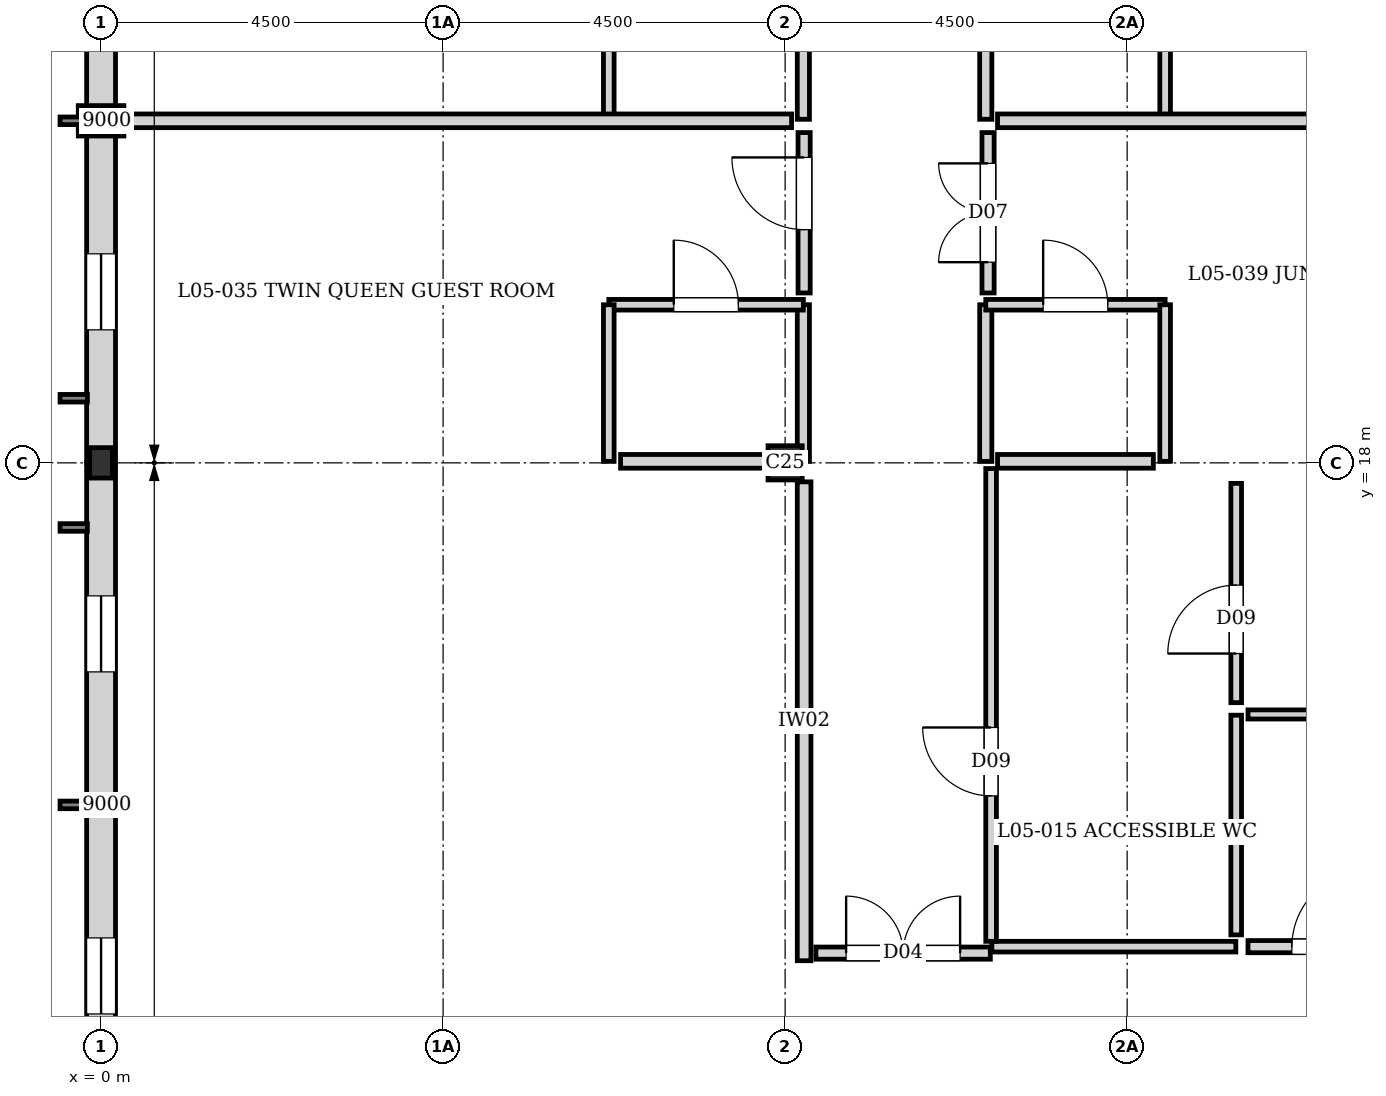
"""IFC4 building model, lengths in metres.
Left out: names, types, materials, properties, quantities, classifications, styles, units other than length and angle.
Written with IfcOpenShell. Run it as: python <this file> out.ifc"""

import sys

from ifc_helpers import new_model, si_unit, direction, frame, frame_2d, origin, origin_2d, place, context, subcontext, project, spatial, rectangle, i_section, extrude, element, fill, save


model = new_model("IFC4")
c1 = context("Model", 3, precision=1e-05, world=origin(), true_north=direction((0.0, 1.0)))
c2 = subcontext(c1, "Body", "Model", "MODEL_VIEW")
j1 = project(units=[si_unit("LENGTHUNIT", "METRE"), si_unit("PLANEANGLEUNIT", "RADIAN")], contexts=[c1])
p1 = place(None, origin())
s1 = spatial("IfcSite", under=j1, at=p1, CompositionType="ELEMENT")
p2 = place(p1, origin())
s2 = spatial("IfcBuilding", under=s1, at=p2, CompositionType="ELEMENT")
p3 = place(p2, frame((0.0, 0.0, 17.6)))
s3 = spatial("IfcBuildingStorey", under=s2, at=p3, CompositionType="ELEMENT", Elevation=17.6)
p4 = place(p3, frame((0.0, 18.0, 0.0), z_axis=(0.0, 0.0, 1.0), x_axis=(1.0, 0.0, 0.0)))
e1 = element("IfcColumn", 1, at=p4, inside=s3, PredefinedType="COLUMN", context=c2, shape_type="SweptSolid", body=[
    extrude(i_section(OverallWidth=0.3, OverallDepth=0.4, WebThickness=0.013, FlangeThickness=0.024, at=origin_2d()), origin(), (0.0, 0.0, 1.0), 3.04),
])
p5 = place(p3, frame((9.0, 18.0, 0.0), z_axis=(0.0, 0.0, 1.0), x_axis=(1.0, 0.0, 0.0)))
e2 = element("IfcColumn", 2, at=p5, inside=s3, PredefinedType="COLUMN", context=c2, shape_type="SweptSolid", body=[
    extrude(rectangle(XDim=0.45, YDim=0.45, at=origin_2d()), origin(), (0.0, 0.0, 1.0), 3.04),
])
p6 = place(p3, frame((0.0, 22.5, 0.0), z_axis=(0.0, 0.0, 1.0), x_axis=(0.0, 1.0, 0.0)))
e3 = element("IfcColumn", 3, at=p6, inside=s3, PredefinedType="PILASTER", context=c2, shape_type="SweptSolid", body=[
    extrude(rectangle(XDim=0.4, YDim=0.6, at=origin_2d()), origin(), (0.0, 0.0, 1.0), 3.04),
])
p7 = place(p3, frame((0.0, 9.0, 0.0), z_axis=(0.0, 0.0, 1.0), x_axis=(0.0, 1.0, 0.0)))
e4 = element("IfcWall", 4, at=p7, inside=s3, PredefinedType="SOLIDWALL", context=c2, shape_type="SweptSolid", body=[
    extrude(rectangle(XDim=9.0, YDim=0.38, at=frame_2d((4.5, 0.0))), origin(), (0.0, 0.0, 1.0), 2.48),
])
p8 = place(p7, frame((1.75, 0.0, 0.35)))
e5 = element("IfcOpeningElement", 5, at=p8, cuts=e4, PredefinedType="OPENING", context=c2, shape_type="SweptSolid", body=[
    extrude(rectangle(XDim=1.0, YDim=1.6, at=frame_2d((0.5, 0.8))), frame((0.0, 0.2, 0.0), z_axis=(0.0, -1.0, 0.0), x_axis=(1.0, 0.0, 0.0)), (0.0, 0.0, 1.0), 0.4),
])
p9 = place(p7, frame((6.25, 0.0, 0.35)))
e6 = element("IfcOpeningElement", 6, at=p9, cuts=e4, PredefinedType="OPENING", context=c2, shape_type="SweptSolid", body=[
    extrude(rectangle(XDim=1.0, YDim=1.6, at=frame_2d((0.5, 0.8))), frame((0.0, 0.2, 0.0), z_axis=(0.0, -1.0, 0.0), x_axis=(1.0, 0.0, 0.0)), (0.0, 0.0, 1.0), 0.4),
])
p10 = place(p3, frame((0.0, 18.0, 0.0), z_axis=(0.0, 0.0, 1.0), x_axis=(0.0, 1.0, 0.0)))
e7 = element("IfcWall", 7, at=p10, inside=s3, PredefinedType="SOLIDWALL", context=c2, shape_type="SweptSolid", body=[
    extrude(rectangle(XDim=9.0, YDim=0.38, at=frame_2d((4.5, 0.0))), origin(), (0.0, 0.0, 1.0), 2.42),
])
p11 = place(p10, frame((1.75, 0.0, 0.35)))
e8 = element("IfcOpeningElement", 8, at=p11, cuts=e7, PredefinedType="OPENING", context=c2, shape_type="SweptSolid", body=[
    extrude(rectangle(XDim=1.0, YDim=1.6, at=frame_2d((0.5, 0.8))), frame((0.0, 0.2, 0.0), z_axis=(0.0, -1.0, 0.0), x_axis=(1.0, 0.0, 0.0)), (0.0, 0.0, 1.0), 0.4),
])
p12 = place(p10, frame((6.25, 0.0, 0.35)))
e9 = element("IfcOpeningElement", 9, at=p12, cuts=e7, PredefinedType="OPENING", context=c2, shape_type="SweptSolid", body=[
    extrude(rectangle(XDim=1.0, YDim=1.6, at=frame_2d((0.5, 0.8))), frame((0.0, 0.2, 0.0), z_axis=(0.0, -1.0, 0.0), x_axis=(1.0, 0.0, 0.0)), (0.0, 0.0, 1.0), 0.4),
])
p13 = place(p3, frame((9.24, 18.02, 0.0), z_axis=(0.0, 0.0, 1.0), x_axis=(0.0, 1.0, 0.0)))
e10 = element("IfcWall", 10, at=p13, inside=s3, PredefinedType="PARTITIONING", context=c2, shape_type="SweptSolid", body=[
    extrude(rectangle(XDim=2.06, YDim=0.16, at=frame_2d((1.03, 0.0))), origin(), (0.0, 0.0, 1.0), 2.82),
])
p14 = place(p3, frame((6.68, 20.08, 0.0), z_axis=(0.0, 0.0, 1.0), x_axis=(1.0, 0.0, 0.0)))
e11 = element("IfcWall", 11, at=p14, inside=s3, PredefinedType="PLUMBINGWALL", context=c2, shape_type="SweptSolid", body=[
    extrude(rectangle(XDim=2.56, YDim=0.14, at=frame_2d((1.28, 0.0))), origin(), (0.0, 0.0, 1.0), 2.82),
])
p15 = place(p14, frame((0.855, 0.0, 0.0)))
e12 = element("IfcOpeningElement", 12, at=p15, cuts=e11, PredefinedType="OPENING", context=c2, shape_type="SweptSolid", body=[
    extrude(rectangle(XDim=0.85, YDim=2.04, at=frame_2d((0.425, 1.02))), frame((0.0, 0.08, 0.0), z_axis=(0.0, -1.0, 0.0), x_axis=(1.0, 0.0, 0.0)), (0.0, 0.0, 1.0), 0.16),
])
p16 = place(p3, frame((6.68, 18.02, 0.0), z_axis=(0.0, 0.0, 1.0), x_axis=(0.0, 1.0, 0.0)))
e13 = element("IfcWall", 13, at=p16, inside=s3, PredefinedType="PLUMBINGWALL", context=c2, shape_type="SweptSolid", body=[
    extrude(rectangle(XDim=2.06, YDim=0.14, at=frame_2d((1.03, 0.0))), origin(), (0.0, 0.0, 1.0), 2.82),
])
p17 = place(p3, frame((9.24, 22.52, 0.0), z_axis=(0.0, 0.0, 1.0), x_axis=(0.0, 1.0, 0.0)))
e14 = element("IfcWall", 14, at=p17, inside=s3, PredefinedType="PARTITIONING", context=c2, shape_type="SweptSolid", body=[
    extrude(rectangle(XDim=2.06, YDim=0.16, at=frame_2d((1.03, 0.0))), origin(), (0.0, 0.0, 1.0), 2.82),
])
p18 = place(p3, frame((6.68, 22.52, 0.0), z_axis=(0.0, 0.0, 1.0), x_axis=(0.0, 1.0, 0.0)))
e15 = element("IfcWall", 15, at=p18, inside=s3, PredefinedType="PLUMBINGWALL", context=c2, shape_type="SweptSolid", body=[
    extrude(rectangle(XDim=2.06, YDim=0.14, at=frame_2d((1.03, 0.0))), origin(), (0.0, 0.0, 1.0), 2.82),
])
p19 = place(p3, frame((11.64, 18.02, 0.0), z_axis=(0.0, 0.0, 1.0), x_axis=(0.0, 1.0, 0.0)))
e16 = element("IfcWall", 16, at=p19, inside=s3, PredefinedType="PARTITIONING", context=c2, shape_type="SweptSolid", body=[
    extrude(rectangle(XDim=2.06, YDim=0.16, at=frame_2d((1.03, 0.0))), origin(), (0.0, 0.0, 1.0), 2.82),
])
p20 = place(p3, frame((11.64, 20.08, 0.0), z_axis=(0.0, 0.0, 1.0), x_axis=(1.0, 0.0, 0.0)))
e17 = element("IfcWall", 17, at=p20, inside=s3, PredefinedType="PLUMBINGWALL", context=c2, shape_type="SweptSolid", body=[
    extrude(rectangle(XDim=2.36, YDim=0.14, at=frame_2d((1.18, 0.0))), origin(), (0.0, 0.0, 1.0), 2.82),
])
p21 = place(p20, frame((0.755, 0.0, 0.0)))
e18 = element("IfcOpeningElement", 18, at=p21, cuts=e17, PredefinedType="OPENING", context=c2, shape_type="SweptSolid", body=[
    extrude(rectangle(XDim=0.85, YDim=2.04, at=frame_2d((0.425, 1.02))), frame((0.0, 0.08, 0.0), z_axis=(0.0, -1.0, 0.0), x_axis=(1.0, 0.0, 0.0)), (0.0, 0.0, 1.0), 0.16),
])
p22 = place(p3, frame((14.0, 18.02, 0.0), z_axis=(0.0, 0.0, 1.0), x_axis=(0.0, 1.0, 0.0)))
e19 = element("IfcWall", 19, at=p22, inside=s3, PredefinedType="PLUMBINGWALL", context=c2, shape_type="SweptSolid", body=[
    extrude(rectangle(XDim=2.06, YDim=0.14, at=frame_2d((1.03, 0.0))), origin(), (0.0, 0.0, 1.0), 2.82),
])
p23 = place(p3, frame((11.64, 22.52, 0.0), z_axis=(0.0, 0.0, 1.0), x_axis=(0.0, 1.0, 0.0)))
e20 = element("IfcWall", 20, at=p23, inside=s3, PredefinedType="PARTITIONING", context=c2, shape_type="SweptSolid", body=[
    extrude(rectangle(XDim=2.06, YDim=0.16, at=frame_2d((1.03, 0.0))), origin(), (0.0, 0.0, 1.0), 2.82),
])
p24 = place(p3, frame((14.0, 22.52, 0.0), z_axis=(0.0, 0.0, 1.0), x_axis=(0.0, 1.0, 0.0)))
e21 = element("IfcWall", 21, at=p24, inside=s3, PredefinedType="PLUMBINGWALL", context=c2, shape_type="SweptSolid", body=[
    extrude(rectangle(XDim=2.06, YDim=0.14, at=frame_2d((1.03, 0.0))), origin(), (0.0, 0.0, 1.0), 2.82),
])
p25 = place(p3, frame((9.25, 11.45, 0.0), z_axis=(0.0, 0.0, 1.0), x_axis=(0.0, 1.0, 0.0)))
e22 = element("IfcWall", 22, at=p25, inside=s3, PredefinedType="PARTITIONING", context=c2, shape_type="SweptSolid", body=[
    extrude(rectangle(XDim=6.3, YDim=0.18, at=frame_2d((3.15, 0.0))), origin(), (0.0, 0.0, 1.0), 2.82),
])
p26 = place(p3, frame((0.195, 22.5, 0.0), z_axis=(0.0, 0.0, 1.0), x_axis=(1.0, 0.0, 0.0)))
e23 = element("IfcWall", 23, at=p26, inside=s3, PredefinedType="PARTITIONING", context=c2, shape_type="SweptSolid", body=[
    extrude(rectangle(XDim=8.89, YDim=0.18, at=frame_2d((4.445, 0.0))), origin(), (0.0, 0.0, 1.0), 2.82),
])
p27 = place(p3, frame((11.795, 22.5, 0.0), z_axis=(0.0, 0.0, 1.0), x_axis=(1.0, 0.0, 0.0)))
e24 = element("IfcWall", 24, at=p27, inside=s3, PredefinedType="PARTITIONING", context=c2, shape_type="SweptSolid", body=[
    extrude(rectangle(XDim=6.03, YDim=0.18, at=frame_2d((3.015, 0.0))), origin(), (0.0, 0.0, 1.0), 2.82),
])
p28 = place(p3, frame((6.835, 18.02, 0.0), z_axis=(0.0, 0.0, 1.0), x_axis=(1.0, 0.0, 0.0)))
e25 = element("IfcWall", 25, at=p28, inside=s3, PredefinedType="PARTITIONING", context=c2, shape_type="SweptSolid", body=[
    extrude(rectangle(XDim=2.26, YDim=0.18, at=frame_2d((1.13, 0.0))), origin(), (0.0, 0.0, 1.0), 2.38),
])
p29 = place(p3, frame((11.795, 18.02, 0.0), z_axis=(0.0, 0.0, 1.0), x_axis=(1.0, 0.0, 0.0)))
e26 = element("IfcWall", 26, at=p29, inside=s3, PredefinedType="PARTITIONING", context=c2, shape_type="SweptSolid", body=[
    extrude(rectangle(XDim=2.05, YDim=0.18, at=frame_2d((1.025, 0.0))), origin(), (0.0, 0.0, 1.0), 2.55),
])
p30 = place(p3, frame((11.72, 11.635, 0.0), z_axis=(0.0, 0.0, 1.0), x_axis=(1.0, 0.0, 0.0)))
e27 = element("IfcWall", 27, at=p30, inside=s3, PredefinedType="PLUMBINGWALL", context=c2, shape_type="SweptSolid", body=[
    extrude(rectangle(XDim=3.21, YDim=0.14, at=frame_2d((1.605, 0.0))), origin(), (0.0, 0.0, 1.0), 2.82),
])
p31 = place(p3, frame((14.935, 11.79, 0.0), z_axis=(0.0, 0.0, 1.0), x_axis=(0.0, 1.0, 0.0)))
e28 = element("IfcWall", 28, at=p31, inside=s3, PredefinedType="PLUMBINGWALL", context=c2, shape_type="SweptSolid", body=[
    extrude(rectangle(XDim=2.89, YDim=0.14, at=frame_2d((1.445, 0.0))), origin(), (0.0, 0.0, 1.0), 2.82),
])
p32 = place(p3, frame((15.09, 14.69, 0.0), z_axis=(0.0, 0.0, 1.0), x_axis=(1.0, 0.0, 0.0)))
e29 = element("IfcWall", 29, at=p32, inside=s3, PredefinedType="PARTITIONING", context=c2, shape_type="SweptSolid", body=[
    extrude(rectangle(XDim=2.64, YDim=0.12, at=frame_2d((1.32, 0.0))), origin(), (0.0, 0.0, 1.0), 2.82),
])
p33 = place(p3, frame((9.405, 11.55, 0.0), z_axis=(0.0, 0.0, 1.0), x_axis=(1.0, 0.0, 0.0)))
e30 = element("IfcWall", 30, at=p33, inside=s3, PredefinedType="PARTITIONING", context=c2, shape_type="SweptSolid", body=[
    extrude(rectangle(XDim=2.295, YDim=0.16, at=frame_2d((1.147, 0.0))), origin(), (0.0, 0.0, 1.0), 2.82),
])
p34 = place(p33, frame((0.397, 0.0, 0.0)))
e31 = element("IfcOpeningElement", 31, at=p34, cuts=e30, PredefinedType="OPENING", context=c2, shape_type="SweptSolid", body=[
    extrude(rectangle(XDim=1.5, YDim=2.1, at=frame_2d((0.75, 1.05))), frame((0.0, 0.09, 0.0), z_axis=(0.0, -1.0, 0.0), x_axis=(1.0, 0.0, 0.0)), (0.0, 0.0, 1.0), 0.18),
])
p35 = place(p3, frame((15.09, 11.635, 0.0), z_axis=(0.0, 0.0, 1.0), x_axis=(1.0, 0.0, 0.0)))
e32 = element("IfcWall", 32, at=p35, inside=s3, PredefinedType="PARTITIONING", context=c2, shape_type="SweptSolid", body=[
    extrude(rectangle(XDim=2.835, YDim=0.16, at=frame_2d((1.417, 0.0))), origin(), (0.0, 0.0, 1.0), 2.82),
])
p36 = place(p35, frame((0.577, 0.0, 0.0)))
e33 = element("IfcOpeningElement", 33, at=p36, cuts=e32, PredefinedType="OPENING", context=c2, shape_type="SweptSolid", body=[
    extrude(rectangle(XDim=1.0, YDim=2.1, at=frame_2d((0.5, 1.05))), frame((0.0, 0.09, 0.0), z_axis=(0.0, -1.0, 0.0), x_axis=(1.0, 0.0, 0.0)), (0.0, 0.0, 1.0), 0.18),
])
p37 = place(p3, frame((11.71, 11.705, 0.0), z_axis=(0.0, 0.0, 1.0), x_axis=(0.0, 1.0, 0.0)))
e34 = element("IfcWall", 34, at=p37, inside=s3, PredefinedType="PLUMBINGWALL", context=c2, shape_type="SweptSolid", body=[
    extrude(rectangle(XDim=6.22, YDim=0.14, at=frame_2d((3.11, 0.0))), origin(), (0.0, 0.0, 1.0), 2.82),
])
p38 = place(p37, frame((1.914, 0.0, 0.0)))
e35 = element("IfcOpeningElement", 35, at=p38, cuts=e34, PredefinedType="OPENING", context=c2, shape_type="SweptSolid", body=[
    extrude(rectangle(XDim=0.9, YDim=2.1, at=frame_2d((0.45, 1.05))), frame((0.0, 0.08, 0.0), z_axis=(0.0, -1.0, 0.0), x_axis=(1.0, 0.0, 0.0)), (0.0, 0.0, 1.0), 0.16),
])
p39 = place(p3, frame((9.25, 20.235, 0.0), z_axis=(0.0, 0.0, 1.0), x_axis=(0.0, 1.0, 0.0)))
e36 = element("IfcWall", 36, at=p39, inside=s3, PredefinedType="PARTITIONING", context=c2, shape_type="SweptSolid", body=[
    extrude(rectangle(XDim=2.11, YDim=0.16, at=frame_2d((1.055, 0.0))), origin(), (0.0, 0.0, 1.0), 2.82),
])
p40 = place(p39, frame((0.833, 0.0, 0.0)))
e37 = element("IfcOpeningElement", 37, at=p40, cuts=e36, PredefinedType="OPENING", context=c2, shape_type="SweptSolid", body=[
    extrude(rectangle(XDim=0.95, YDim=2.15, at=frame_2d((0.475, 1.075))), frame((0.0, 0.09, 0.0), z_axis=(0.0, -1.0, 0.0), x_axis=(1.0, 0.0, 0.0)), (0.0, 0.0, 1.0), 0.18),
])
p41 = place(p3, frame((11.67, 20.235, 0.0), z_axis=(0.0, 0.0, 1.0), x_axis=(0.0, 1.0, 0.0)))
e38 = element("IfcWall", 38, at=p41, inside=s3, PredefinedType="PARTITIONING", context=c2, shape_type="SweptSolid", body=[
    extrude(rectangle(XDim=2.11, YDim=0.16, at=frame_2d((1.055, 0.0))), origin(), (0.0, 0.0, 1.0), 2.82),
])
p42 = place(p41, frame((0.405, 0.0, 0.0)))
e39 = element("IfcOpeningElement", 39, at=p42, cuts=e38, PredefinedType="OPENING", context=c2, shape_type="SweptSolid", body=[
    extrude(rectangle(XDim=1.3, YDim=2.25, at=frame_2d((0.65, 1.125))), frame((0.0, 0.09, 0.0), z_axis=(0.0, -1.0, 0.0), x_axis=(1.0, 0.0, 0.0)), (0.0, 0.0, 1.0), 0.18),
])
p43 = place(p3, frame((14.935, 14.845, 0.0), z_axis=(0.0, 0.0, 1.0), x_axis=(0.0, 1.0, 0.0)))
e40 = element("IfcWall", 40, at=p43, inside=s3, PredefinedType="PLUMBINGWALL", context=c2, shape_type="SweptSolid", body=[
    extrude(rectangle(XDim=2.885, YDim=0.14, at=frame_2d((1.442, 0.0))), origin(), (0.0, 0.0, 1.0), 2.82),
])
p44 = place(p43, frame((0.646, 0.0, 0.0)))
e41 = element("IfcOpeningElement", 41, at=p44, cuts=e40, PredefinedType="OPENING", context=c2, shape_type="SweptSolid", body=[
    extrude(rectangle(XDim=0.9, YDim=2.1, at=frame_2d((0.45, 1.05))), frame((0.0, 0.08, 0.0), z_axis=(0.0, -1.0, 0.0), x_axis=(1.0, 0.0, 0.0)), (0.0, 0.0, 1.0), 0.16),
])
p45 = place(p8, origin())
e42 = element("IfcWindow", 42, at=p45, inside=s3, PartitioningType="SINGLE_PANEL", PredefinedType="WINDOW", context=c2, shape_type="SweptSolid", body=[
    extrude(rectangle(XDim=1.0, YDim=1.6, at=frame_2d((0.5, 0.8))), frame((0.0, 0.03, 0.0), z_axis=(0.0, -1.0, 0.0), x_axis=(1.0, 0.0, 0.0)), (0.0, 0.0, 1.0), 0.06),
])
fill(e5, e42)
p46 = place(p9, origin())
e43 = element("IfcWindow", 43, at=p46, inside=s3, PartitioningType="SINGLE_PANEL", PredefinedType="WINDOW", context=c2, shape_type="SweptSolid", body=[
    extrude(rectangle(XDim=1.0, YDim=1.6, at=frame_2d((0.5, 0.8))), frame((0.0, 0.03, 0.0), z_axis=(0.0, -1.0, 0.0), x_axis=(1.0, 0.0, 0.0)), (0.0, 0.0, 1.0), 0.06),
])
fill(e6, e43)
p47 = place(p11, origin())
e44 = element("IfcWindow", 44, at=p47, inside=s3, PartitioningType="SINGLE_PANEL", PredefinedType="WINDOW", context=c2, shape_type="SweptSolid", body=[
    extrude(rectangle(XDim=1.0, YDim=1.6, at=frame_2d((0.5, 0.8))), frame((0.0, 0.03, 0.0), z_axis=(0.0, -1.0, 0.0), x_axis=(1.0, 0.0, 0.0)), (0.0, 0.0, 1.0), 0.06),
])
fill(e8, e44)
p48 = place(p15, origin())
e45 = element("IfcDoor", 45, at=p48, inside=s3, OperationType="SINGLE_SWING_LEFT", PredefinedType="DOOR", context=c2, shape_type="SweptSolid", body=[
    extrude(rectangle(XDim=0.85, YDim=2.04, at=frame_2d((0.425, 1.02))), frame((0.0, 0.025, 0.0), z_axis=(0.0, -1.0, 0.0), x_axis=(1.0, 0.0, 0.0)), (0.0, 0.0, 1.0), 0.05),
])
fill(e12, e45)
p49 = place(p21, origin())
e46 = element("IfcDoor", 46, at=p49, inside=s3, OperationType="SINGLE_SWING_LEFT", PredefinedType="DOOR", context=c2, shape_type="SweptSolid", body=[
    extrude(rectangle(XDim=0.85, YDim=2.04, at=frame_2d((0.425, 1.02))), frame((0.0, 0.025, 0.0), z_axis=(0.0, -1.0, 0.0), x_axis=(1.0, 0.0, 0.0)), (0.0, 0.0, 1.0), 0.05),
])
fill(e18, e46)
p50 = place(p34, origin())
e47 = element("IfcDoor", 47, at=p50, inside=s3, OperationType="DOUBLE_DOOR_SINGLE_SWING", PredefinedType="DOOR", context=c2, shape_type="SweptSolid", body=[
    extrude(rectangle(XDim=1.5, YDim=2.1, at=frame_2d((0.75, 1.05))), frame((0.0, 0.025, 0.0), z_axis=(0.0, -1.0, 0.0), x_axis=(1.0, 0.0, 0.0)), (0.0, 0.0, 1.0), 0.05),
])
fill(e31, e47)
p51 = place(p36, origin())
e48 = element("IfcDoor", 48, at=p51, inside=s3, OperationType="SINGLE_SWING_RIGHT", PredefinedType="DOOR", context=c2, shape_type="SweptSolid", body=[
    extrude(rectangle(XDim=1.0, YDim=2.1, at=frame_2d((0.5, 1.05))), frame((0.0, 0.025, 0.0), z_axis=(0.0, -1.0, 0.0), x_axis=(1.0, 0.0, 0.0)), (0.0, 0.0, 1.0), 0.05),
])
fill(e33, e48)
p52 = place(p38, origin())
e49 = element("IfcDoor", 49, at=p52, inside=s3, OperationType="SINGLE_SWING_RIGHT", PredefinedType="DOOR", context=c2, shape_type="SweptSolid", body=[
    extrude(rectangle(XDim=0.9, YDim=2.1, at=frame_2d((0.45, 1.05))), frame((0.0, 0.025, 0.0), z_axis=(0.0, -1.0, 0.0), x_axis=(1.0, 0.0, 0.0)), (0.0, 0.0, 1.0), 0.05),
])
fill(e35, e49)
p53 = place(p40, origin())
e50 = element("IfcDoor", 50, at=p53, inside=s3, OperationType="SINGLE_SWING_RIGHT", PredefinedType="DOOR", context=c2, shape_type="SweptSolid", body=[
    extrude(rectangle(XDim=0.95, YDim=2.15, at=frame_2d((0.475, 1.075))), frame((0.0, 0.025, 0.0), z_axis=(0.0, -1.0, 0.0), x_axis=(1.0, 0.0, 0.0)), (0.0, 0.0, 1.0), 0.05),
])
fill(e37, e50)
p54 = place(p42, origin())
e51 = element("IfcDoor", 51, at=p54, inside=s3, OperationType="DOUBLE_DOOR_SINGLE_SWING", PredefinedType="DOOR", context=c2, shape_type="SweptSolid", body=[
    extrude(rectangle(XDim=1.3, YDim=2.25, at=frame_2d((0.65, 1.125))), frame((0.0, 0.025, 0.0), z_axis=(0.0, -1.0, 0.0), x_axis=(1.0, 0.0, 0.0)), (0.0, 0.0, 1.0), 0.05),
])
fill(e39, e51)
p55 = place(p44, origin())
e52 = element("IfcDoor", 52, at=p55, inside=s3, OperationType="SINGLE_SWING_LEFT", PredefinedType="DOOR", context=c2, shape_type="SweptSolid", body=[
    extrude(rectangle(XDim=0.9, YDim=2.1, at=frame_2d((0.45, 1.05))), frame((0.0, 0.025, 0.0), z_axis=(0.0, -1.0, 0.0), x_axis=(1.0, 0.0, 0.0)), (0.0, 0.0, 1.0), 0.05),
])
fill(e41, e52)
save(model, sys.argv[1])
